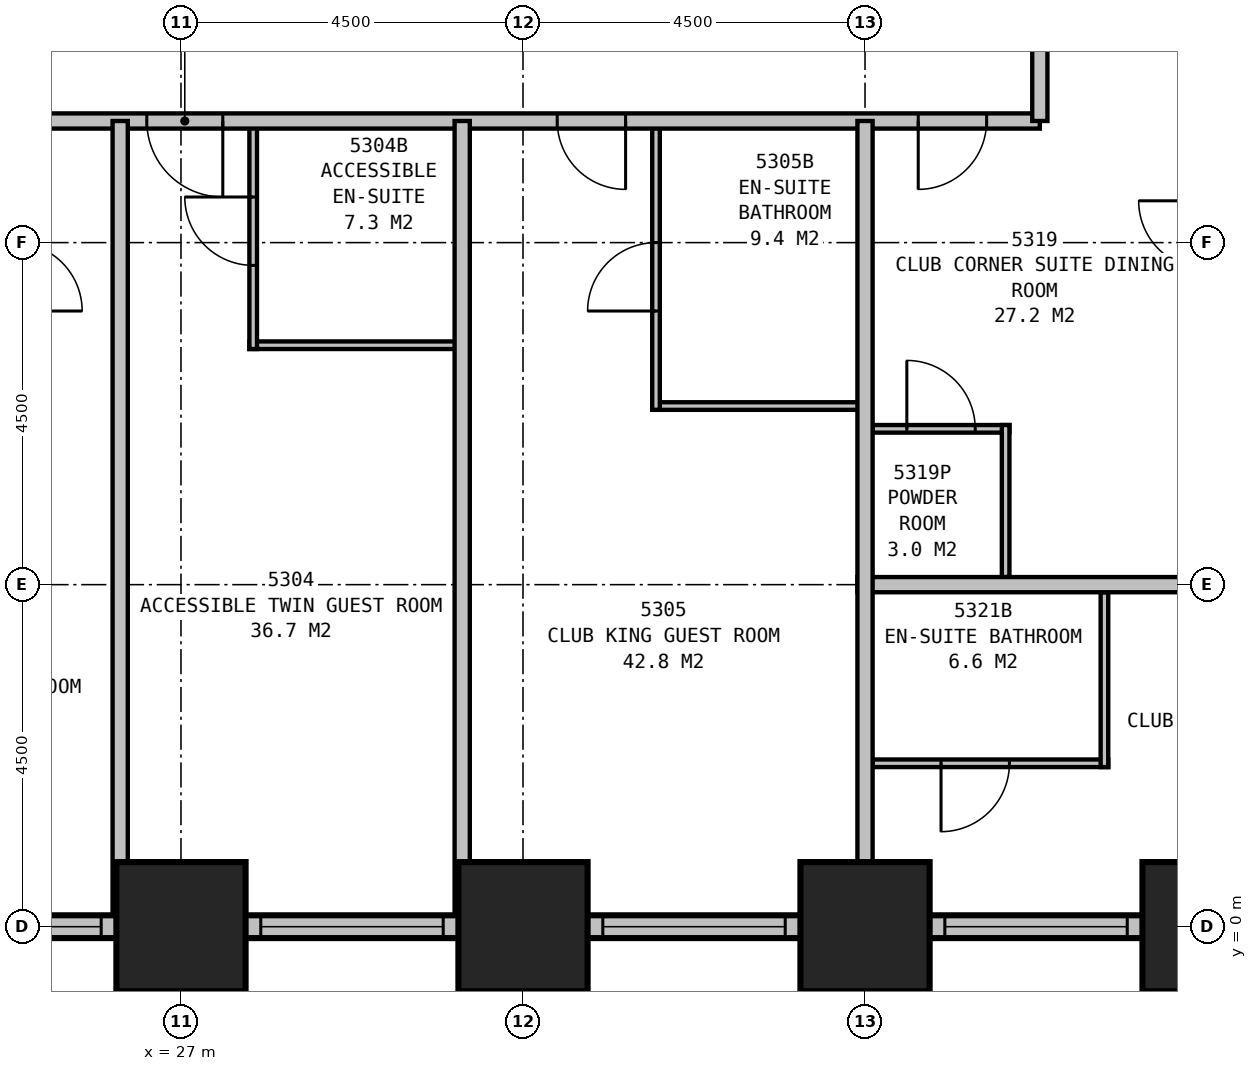
"""IFC4 building model, lengths in metres.
Left out: names, types, materials, properties, quantities, classifications, styles, units other than length and angle.
Written with IfcOpenShell. Run it as: python <this file> out.ifc"""

import sys

from ifc_helpers import new_model, si_unit, direction, frame, frame_2d, origin, origin_2d, place, context, subcontext, project, spatial, rectangle, extrude, element, fill, save


model = new_model("IFC4")
c1 = context("Model", 3, precision=1e-05, world=origin(), true_north=direction((0.0, 1.0)))
c2 = subcontext(c1, "Body", "Model", "MODEL_VIEW")
j1 = project(units=[si_unit("LENGTHUNIT", "METRE"), si_unit("PLANEANGLEUNIT", "RADIAN")], contexts=[c1])
p1 = place(None, origin())
s1 = spatial("IfcSite", under=j1, at=p1, CompositionType="ELEMENT")
p2 = place(p1, origin())
s2 = spatial("IfcBuilding", under=s1, at=p2, CompositionType="ELEMENT")
p3 = place(p2, frame((0.0, 0.0, 204.4)))
s3 = spatial("IfcBuildingStorey", under=s2, at=p3, CompositionType="ELEMENT", Elevation=204.4)
for number, where, z_axis, x_axis in (
    (1, (27.0, 0.0, 0.0), (0.0, 0.0, 1.0), (1.0, 0.0, 0.0)),
    (2, (31.5, 0.0, 0.0), (0.0, 0.0, 1.0), (1.0, 0.0, 0.0)),
    (3, (36.0, 0.0, 0.0), (0.0, 0.0, 1.0), (1.0, 0.0, 0.0)),
    (4, (40.5, 0.0, 0.0), (0.0, 0.0, 1.0), (1.0, 0.0, 0.0)),
):
    element("IfcColumn", number, at=place(p3, frame(where, z_axis=z_axis, x_axis=x_axis)), inside=s3, PredefinedType="COLUMN", context=c2, shape_type="SweptSolid", body=[
        extrude(rectangle(XDim=1.7, YDim=1.7, at=origin_2d()), origin(), (0.0, 0.0, 1.0), 3.5),
    ])
p4 = place(p3, frame((8.85, 0.0, 0.0), z_axis=(0.0, 0.0, 1.0), x_axis=(1.0, 0.0, 0.0)))
e5 = element("IfcWall", 5, at=p4, inside=s3, PredefinedType="STANDARD", context=c2, shape_type="SweptSolid", body=[
    extrude(rectangle(XDim=36.3, YDim=0.3, at=frame_2d((18.15, 0.0))), origin(), (0.0, 0.0, 1.0), 2.25),
])
p5 = place(p4, frame((1.2, 0.0, 0.5)))
e6 = element("IfcOpeningElement", 6, at=p5, cuts=e5, PredefinedType="OPENING", context=c2, shape_type="SweptSolid", body=[
    extrude(rectangle(XDim=2.4, YDim=1.6, at=frame_2d((1.2, 0.8))), frame((0.0, 0.16, 0.0), z_axis=(0.0, -1.0, 0.0), x_axis=(1.0, 0.0, 0.0)), (0.0, 0.0, 1.0), 0.32),
])
p6 = place(p4, frame((5.7, 0.0, 0.5)))
e7 = element("IfcOpeningElement", 7, at=p6, cuts=e5, PredefinedType="OPENING", context=c2, shape_type="SweptSolid", body=[
    extrude(rectangle(XDim=2.4, YDim=1.6, at=frame_2d((1.2, 0.8))), frame((0.0, 0.16, 0.0), z_axis=(0.0, -1.0, 0.0), x_axis=(1.0, 0.0, 0.0)), (0.0, 0.0, 1.0), 0.32),
])
p7 = place(p4, frame((10.2, 0.0, 0.5)))
e8 = element("IfcOpeningElement", 8, at=p7, cuts=e5, PredefinedType="OPENING", context=c2, shape_type="SweptSolid", body=[
    extrude(rectangle(XDim=2.4, YDim=1.6, at=frame_2d((1.2, 0.8))), frame((0.0, 0.16, 0.0), z_axis=(0.0, -1.0, 0.0), x_axis=(1.0, 0.0, 0.0)), (0.0, 0.0, 1.0), 0.32),
])
p8 = place(p4, frame((14.7, 0.0, 0.5)))
e9 = element("IfcOpeningElement", 9, at=p8, cuts=e5, PredefinedType="OPENING", context=c2, shape_type="SweptSolid", body=[
    extrude(rectangle(XDim=2.4, YDim=1.6, at=frame_2d((1.2, 0.8))), frame((0.0, 0.16, 0.0), z_axis=(0.0, -1.0, 0.0), x_axis=(1.0, 0.0, 0.0)), (0.0, 0.0, 1.0), 0.32),
])
p9 = place(p4, frame((19.2, 0.0, 0.5)))
e10 = element("IfcOpeningElement", 10, at=p9, cuts=e5, PredefinedType="OPENING", context=c2, shape_type="SweptSolid", body=[
    extrude(rectangle(XDim=2.4, YDim=1.6, at=frame_2d((1.2, 0.8))), frame((0.0, 0.16, 0.0), z_axis=(0.0, -1.0, 0.0), x_axis=(1.0, 0.0, 0.0)), (0.0, 0.0, 1.0), 0.32),
])
p10 = place(p4, frame((23.7, 0.0, 0.5)))
e11 = element("IfcOpeningElement", 11, at=p10, cuts=e5, PredefinedType="OPENING", context=c2, shape_type="SweptSolid", body=[
    extrude(rectangle(XDim=2.4, YDim=1.6, at=frame_2d((1.2, 0.8))), frame((0.0, 0.16, 0.0), z_axis=(0.0, -1.0, 0.0), x_axis=(1.0, 0.0, 0.0)), (0.0, 0.0, 1.0), 0.32),
])
p11 = place(p4, frame((28.2, 0.0, 0.5)))
e12 = element("IfcOpeningElement", 12, at=p11, cuts=e5, PredefinedType="OPENING", context=c2, shape_type="SweptSolid", body=[
    extrude(rectangle(XDim=2.4, YDim=1.6, at=frame_2d((1.2, 0.8))), frame((0.0, 0.16, 0.0), z_axis=(0.0, -1.0, 0.0), x_axis=(1.0, 0.0, 0.0)), (0.0, 0.0, 1.0), 0.32),
])
p12 = place(p4, frame((32.7, 0.0, 0.5)))
e13 = element("IfcOpeningElement", 13, at=p12, cuts=e5, PredefinedType="OPENING", context=c2, shape_type="SweptSolid", body=[
    extrude(rectangle(XDim=2.4, YDim=1.6, at=frame_2d((1.2, 0.8))), frame((0.0, 0.16, 0.0), z_axis=(0.0, -1.0, 0.0), x_axis=(1.0, 0.0, 0.0)), (0.0, 0.0, 1.0), 0.32),
])
p13 = place(p3, frame((11.2, 10.6, 0.0), z_axis=(0.0, 0.0, 1.0), x_axis=(1.0, 0.0, 0.0)))
e14 = element("IfcWall", 14, at=p13, inside=s3, PredefinedType="PARTITIONING", context=c2, shape_type="SweptSolid", body=[
    extrude(rectangle(XDim=27.1, YDim=0.2, at=frame_2d((13.55, 0.0))), origin(), (0.0, 0.0, 1.0), 3.25),
])
p14 = place(p13, frame((3.5, 0.0, 0.0), z_axis=(0.0, 0.0, 1.0), x_axis=(-1.0, 0.0, 0.0)))
e15 = element("IfcOpeningElement", 15, at=p14, cuts=e14, PredefinedType="OPENING", context=c2, shape_type="SweptSolid", body=[
    extrude(rectangle(XDim=0.9, YDim=2.1, at=frame_2d((0.45, 1.05))), frame((0.0, 0.11, 0.0), z_axis=(0.0, -1.0, 0.0), x_axis=(1.0, 0.0, 0.0)), (0.0, 0.0, 1.0), 0.22),
])
p15 = place(p13, frame((16.35, 0.0, 0.0), z_axis=(0.0, 0.0, 1.0), x_axis=(-1.0, 0.0, 0.0)))
e16 = element("IfcOpeningElement", 16, at=p15, cuts=e14, PredefinedType="OPENING", context=c2, shape_type="SweptSolid", body=[
    extrude(rectangle(XDim=1.0, YDim=2.1, at=frame_2d((0.5, 1.05))), frame((0.0, 0.11, 0.0), z_axis=(0.0, -1.0, 0.0), x_axis=(1.0, 0.0, 0.0)), (0.0, 0.0, 1.0), 0.22),
])
p16 = place(p13, frame((21.65, 0.0, 0.0), z_axis=(0.0, 0.0, 1.0), x_axis=(-1.0, 0.0, 0.0)))
e17 = element("IfcOpeningElement", 17, at=p16, cuts=e14, PredefinedType="OPENING", context=c2, shape_type="SweptSolid", body=[
    extrude(rectangle(XDim=0.9, YDim=2.1, at=frame_2d((0.45, 1.05))), frame((0.0, 0.11, 0.0), z_axis=(0.0, -1.0, 0.0), x_axis=(1.0, 0.0, 0.0)), (0.0, 0.0, 1.0), 0.22),
])
p17 = place(p13, frame((1.6, 0.0, 0.0), z_axis=(0.0, 0.0, 1.0), x_axis=(-1.0, 0.0, 0.0)))
e18 = element("IfcOpeningElement", 18, at=p17, cuts=e14, PredefinedType="OPENING", context=c2, shape_type="SweptSolid", body=[
    extrude(rectangle(XDim=0.9, YDim=2.1, at=frame_2d((0.45, 1.05))), frame((0.0, 0.11, 0.0), z_axis=(0.0, -1.0, 0.0), x_axis=(1.0, 0.0, 0.0)), (0.0, 0.0, 1.0), 0.22),
])
p18 = place(p13, frame((26.4, 0.0, 0.0), z_axis=(0.0, 0.0, 1.0), x_axis=(-1.0, 0.0, 0.0)))
e19 = element("IfcOpeningElement", 19, at=p18, cuts=e14, PredefinedType="OPENING", context=c2, shape_type="SweptSolid", body=[
    extrude(rectangle(XDim=0.9, YDim=2.1, at=frame_2d((0.45, 1.05))), frame((0.0, 0.11, 0.0), z_axis=(0.0, -1.0, 0.0), x_axis=(1.0, 0.0, 0.0)), (0.0, 0.0, 1.0), 0.22),
])
p19 = place(p3, frame((38.3, 10.6, 0.0), z_axis=(0.0, 0.0, 1.0), x_axis=(0.0, 1.0, 0.0)))
e20 = element("IfcWall", 20, at=p19, inside=s3, PredefinedType="PARTITIONING", context=c2, shape_type="SweptSolid", body=[
    extrude(rectangle(XDim=18.7, YDim=0.2, at=frame_2d((9.35, 0.0))), origin(), (0.0, 0.0, 1.0), 3.25),
])
p20 = place(p19, frame((6.95, 0.0, 0.0), z_axis=(0.0, 0.0, 1.0), x_axis=(-1.0, 0.0, 0.0)))
e21 = element("IfcOpeningElement", 21, at=p20, cuts=e20, PredefinedType="OPENING", context=c2, shape_type="SweptSolid", body=[
    extrude(rectangle(XDim=0.9, YDim=2.1, at=frame_2d((0.45, 1.05))), frame((0.0, 0.11, 0.0), z_axis=(0.0, -1.0, 0.0), x_axis=(1.0, 0.0, 0.0)), (0.0, 0.0, 1.0), 0.22),
])
p21 = place(p19, frame((10.9, 0.0, 0.0), z_axis=(0.0, 0.0, 1.0), x_axis=(-1.0, 0.0, 0.0)))
e22 = element("IfcOpeningElement", 22, at=p21, cuts=e20, PredefinedType="OPENING", context=c2, shape_type="SweptSolid", body=[
    extrude(rectangle(XDim=0.9, YDim=2.1, at=frame_2d((0.45, 1.05))), frame((0.0, 0.11, 0.0), z_axis=(0.0, -1.0, 0.0), x_axis=(1.0, 0.0, 0.0)), (0.0, 0.0, 1.0), 0.22),
])
for number, where, z_axis, x_axis in (
    (23, (26.2, 10.6, 0.0), (0.0, 0.0, 1.0), (0.0, -1.0, 0.0)),
    (24, (30.7, 10.6, 0.0), (0.0, 0.0, 1.0), (0.0, -1.0, 0.0)),
):
    element("IfcWall", number, at=place(p3, frame(where, z_axis=z_axis, x_axis=x_axis)), inside=s3, PredefinedType="PARTITIONING", context=c2, shape_type="SweptSolid", body=[
        extrude(rectangle(XDim=10.6, YDim=0.2, at=frame_2d((5.3, 0.0))), origin(), (0.0, 0.0, 1.0), 2.25),
    ])
p22 = place(p3, frame((27.9, 7.65, 0.0), z_axis=(0.0, 0.0, 1.0), x_axis=(1.0, 0.0, 0.0)))
e25 = element("IfcWall", 25, at=p22, inside=s3, PredefinedType="PLUMBINGWALL", context=c2, shape_type="SweptSolid", body=[
    extrude(rectangle(XDim=2.8, YDim=0.1, at=frame_2d((1.4, 0.0))), origin(), (0.0, 0.0, 1.0), 3.25),
])
p23 = place(p3, frame((27.95, 10.6, 0.0), z_axis=(0.0, 0.0, 1.0), x_axis=(0.0, -1.0, 0.0)))
e26 = element("IfcWall", 26, at=p23, inside=s3, PredefinedType="PLUMBINGWALL", context=c2, shape_type="SweptSolid", body=[
    extrude(rectangle(XDim=3.0, YDim=0.1, at=frame_2d((1.5, 0.0))), origin(), (0.0, 0.0, 1.0), 3.25),
])
p24 = place(p23, frame((1.9, 0.0, 0.0), z_axis=(0.0, 0.0, 1.0), x_axis=(-1.0, 0.0, 0.0)))
e27 = element("IfcOpeningElement", 27, at=p24, cuts=e26, PredefinedType="OPENING", context=c2, shape_type="SweptSolid", body=[
    extrude(rectangle(XDim=0.9, YDim=2.1, at=frame_2d((0.45, 1.05))), frame((0.0, 0.06, 0.0), z_axis=(0.0, -1.0, 0.0), x_axis=(1.0, 0.0, 0.0)), (0.0, 0.0, 1.0), 0.12),
])
p25 = place(p3, frame((33.2, 6.85, 0.0), z_axis=(0.0, 0.0, 1.0), x_axis=(1.0, 0.0, 0.0)))
e28 = element("IfcWall", 28, at=p25, inside=s3, PredefinedType="PLUMBINGWALL", context=c2, shape_type="SweptSolid", body=[
    extrude(rectangle(XDim=2.8, YDim=0.1, at=frame_2d((1.4, 0.0))), origin(), (0.0, 0.0, 1.0), 3.25),
])
p26 = place(p3, frame((33.25, 10.6, 0.0), z_axis=(0.0, 0.0, 1.0), x_axis=(0.0, -1.0, 0.0)))
e29 = element("IfcWall", 29, at=p26, inside=s3, PredefinedType="PLUMBINGWALL", context=c2, shape_type="SweptSolid", body=[
    extrude(rectangle(XDim=3.8, YDim=0.1, at=frame_2d((1.9, 0.0))), origin(), (0.0, 0.0, 1.0), 3.25),
])
p27 = place(p26, frame((2.5, 0.0, 0.0), z_axis=(0.0, 0.0, 1.0), x_axis=(-1.0, 0.0, 0.0)))
e30 = element("IfcOpeningElement", 30, at=p27, cuts=e29, PredefinedType="OPENING", context=c2, shape_type="SweptSolid", body=[
    extrude(rectangle(XDim=0.9, YDim=2.1, at=frame_2d((0.45, 1.05))), frame((0.0, 0.06, 0.0), z_axis=(0.0, -1.0, 0.0), x_axis=(1.0, 0.0, 0.0)), (0.0, 0.0, 1.0), 0.12),
])
p28 = place(p3, frame((36.0, 10.6, 0.0), z_axis=(0.0, 0.0, 1.0), x_axis=(0.0, -1.0, 0.0)))
e31 = element("IfcWall", 31, at=p28, inside=s3, PredefinedType="PARTITIONING", context=c2, shape_type="SweptSolid", body=[
    extrude(rectangle(XDim=10.6, YDim=0.2, at=frame_2d((5.3, 0.0))), origin(), (0.0, 0.0, 1.0), 2.25),
])
p29 = place(p3, frame((35.9, 4.5, 0.0), z_axis=(0.0, 0.0, 1.0), x_axis=(1.0, 0.0, 0.0)))
e32 = element("IfcWall", 32, at=p29, inside=s3, PredefinedType="PARTITIONING", context=c2, shape_type="SweptSolid", body=[
    extrude(rectangle(XDim=9.1, YDim=0.2, at=frame_2d((4.55, 0.0))), origin(), (0.0, 0.0, 1.0), 3.25),
])
p30 = place(p29, frame((7.1, 0.0, 0.0)))
e33 = element("IfcOpeningElement", 33, at=p30, cuts=e32, PredefinedType="OPENING", context=c2, shape_type="SweptSolid", body=[
    extrude(rectangle(XDim=0.9, YDim=2.1, at=frame_2d((0.45, 1.05))), frame((0.0, 0.11, 0.0), z_axis=(0.0, -1.0, 0.0), x_axis=(1.0, 0.0, 0.0)), (0.0, 0.0, 1.0), 0.22),
])
p31 = place(p3, frame((37.85, 4.6, 0.0), z_axis=(0.0, 0.0, 1.0), x_axis=(0.0, 1.0, 0.0)))
e34 = element("IfcWall", 34, at=p31, inside=s3, PredefinedType="PLUMBINGWALL", context=c2, shape_type="SweptSolid", body=[
    extrude(rectangle(XDim=2.0, YDim=0.1, at=frame_2d((1.0, 0.0))), origin(), (0.0, 0.0, 1.0), 3.25),
])
p32 = place(p3, frame((36.1, 6.55, 0.0), z_axis=(0.0, 0.0, 1.0), x_axis=(1.0, 0.0, 0.0)))
e35 = element("IfcWall", 35, at=p32, inside=s3, PredefinedType="PLUMBINGWALL", context=c2, shape_type="SweptSolid", body=[
    extrude(rectangle(XDim=1.8, YDim=0.1, at=frame_2d((0.9, 0.0))), origin(), (0.0, 0.0, 1.0), 3.25),
])
p33 = place(p32, frame((0.45, 0.0, 0.0)))
e36 = element("IfcOpeningElement", 36, at=p33, cuts=e35, PredefinedType="OPENING", context=c2, shape_type="SweptSolid", body=[
    extrude(rectangle(XDim=0.9, YDim=2.1, at=frame_2d((0.45, 1.05))), frame((0.0, 0.06, 0.0), z_axis=(0.0, -1.0, 0.0), x_axis=(1.0, 0.0, 0.0)), (0.0, 0.0, 1.0), 0.12),
])
p34 = place(p3, frame((39.15, 4.4, 0.0), z_axis=(0.0, 0.0, 1.0), x_axis=(0.0, -1.0, 0.0)))
e37 = element("IfcWall", 37, at=p34, inside=s3, PredefinedType="PLUMBINGWALL", context=c2, shape_type="SweptSolid", body=[
    extrude(rectangle(XDim=2.3, YDim=0.1, at=frame_2d((1.15, 0.0))), origin(), (0.0, 0.0, 1.0), 3.25),
])
p35 = place(p3, frame((36.1, 2.15, 0.0), z_axis=(0.0, 0.0, 1.0), x_axis=(1.0, 0.0, 0.0)))
e38 = element("IfcWall", 38, at=p35, inside=s3, PredefinedType="PLUMBINGWALL", context=c2, shape_type="SweptSolid", body=[
    extrude(rectangle(XDim=3.1, YDim=0.1, at=frame_2d((1.55, 0.0))), origin(), (0.0, 0.0, 1.0), 3.25),
])
p36 = place(p35, frame((1.8, 0.0, 0.0), z_axis=(0.0, 0.0, 1.0), x_axis=(-1.0, 0.0, 0.0)))
e39 = element("IfcOpeningElement", 39, at=p36, cuts=e38, PredefinedType="OPENING", context=c2, shape_type="SweptSolid", body=[
    extrude(rectangle(XDim=0.9, YDim=2.1, at=frame_2d((0.45, 1.05))), frame((0.0, 0.06, 0.0), z_axis=(0.0, -1.0, 0.0), x_axis=(1.0, 0.0, 0.0)), (0.0, 0.0, 1.0), 0.12),
])
p37 = place(p8, origin())
e40 = element("IfcWindow", 40, at=p37, inside=s3, PartitioningType="SINGLE_PANEL", PredefinedType="WINDOW", context=c2, shape_type="SweptSolid", body=[
    extrude(rectangle(XDim=2.4, YDim=1.6, at=frame_2d((1.2, 0.8))), frame((0.0, 0.03, 0.0), z_axis=(0.0, -1.0, 0.0), x_axis=(1.0, 0.0, 0.0)), (0.0, 0.0, 1.0), 0.06),
])
fill(e9, e40)
p38 = place(p9, origin())
e41 = element("IfcWindow", 41, at=p38, inside=s3, PartitioningType="SINGLE_PANEL", PredefinedType="WINDOW", context=c2, shape_type="SweptSolid", body=[
    extrude(rectangle(XDim=2.4, YDim=1.6, at=frame_2d((1.2, 0.8))), frame((0.0, 0.03, 0.0), z_axis=(0.0, -1.0, 0.0), x_axis=(1.0, 0.0, 0.0)), (0.0, 0.0, 1.0), 0.06),
])
fill(e10, e41)
p39 = place(p10, origin())
e42 = element("IfcWindow", 42, at=p39, inside=s3, PartitioningType="SINGLE_PANEL", PredefinedType="WINDOW", context=c2, shape_type="SweptSolid", body=[
    extrude(rectangle(XDim=2.4, YDim=1.6, at=frame_2d((1.2, 0.8))), frame((0.0, 0.03, 0.0), z_axis=(0.0, -1.0, 0.0), x_axis=(1.0, 0.0, 0.0)), (0.0, 0.0, 1.0), 0.06),
])
fill(e11, e42)
p40 = place(p11, origin())
e43 = element("IfcWindow", 43, at=p40, inside=s3, PartitioningType="SINGLE_PANEL", PredefinedType="WINDOW", context=c2, shape_type="SweptSolid", body=[
    extrude(rectangle(XDim=2.4, YDim=1.6, at=frame_2d((1.2, 0.8))), frame((0.0, 0.03, 0.0), z_axis=(0.0, -1.0, 0.0), x_axis=(1.0, 0.0, 0.0)), (0.0, 0.0, 1.0), 0.06),
])
fill(e12, e43)
p41 = place(p15, origin())
e44 = element("IfcDoor", 44, at=p41, inside=s3, OperationType="SINGLE_SWING_LEFT", PredefinedType="DOOR", context=c2, shape_type="SweptSolid", body=[
    extrude(rectangle(XDim=1.0, YDim=2.1, at=frame_2d((0.5, 1.05))), frame((0.0, 0.025, 0.0), z_axis=(0.0, -1.0, 0.0), x_axis=(1.0, 0.0, 0.0)), (0.0, 0.0, 1.0), 0.05),
])
fill(e16, e44)
p42 = place(p16, origin())
e45 = element("IfcDoor", 45, at=p42, inside=s3, OperationType="SINGLE_SWING_LEFT", PredefinedType="DOOR", context=c2, shape_type="SweptSolid", body=[
    extrude(rectangle(XDim=0.9, YDim=2.1, at=frame_2d((0.45, 1.05))), frame((0.0, 0.025, 0.0), z_axis=(0.0, -1.0, 0.0), x_axis=(1.0, 0.0, 0.0)), (0.0, 0.0, 1.0), 0.05),
])
fill(e17, e45)
p43 = place(p18, origin())
e46 = element("IfcDoor", 46, at=p43, inside=s3, OperationType="SINGLE_SWING_RIGHT", PredefinedType="DOOR", context=c2, shape_type="SweptSolid", body=[
    extrude(rectangle(XDim=0.9, YDim=2.1, at=frame_2d((0.45, 1.05))), frame((0.0, 0.025, 0.0), z_axis=(0.0, -1.0, 0.0), x_axis=(1.0, 0.0, 0.0)), (0.0, 0.0, 1.0), 0.05),
])
fill(e19, e46)
p44 = place(p24, origin())
e47 = element("IfcDoor", 47, at=p44, inside=s3, OperationType="SINGLE_SWING_RIGHT", PredefinedType="DOOR", context=c2, shape_type="SweptSolid", body=[
    extrude(rectangle(XDim=0.9, YDim=2.1, at=frame_2d((0.45, 1.05))), frame((0.0, 0.025, 0.0), z_axis=(0.0, -1.0, 0.0), x_axis=(1.0, 0.0, 0.0)), (0.0, 0.0, 1.0), 0.05),
])
fill(e27, e47)
p45 = place(p27, origin())
e48 = element("IfcDoor", 48, at=p45, inside=s3, OperationType="SINGLE_SWING_LEFT", PredefinedType="DOOR", context=c2, shape_type="SweptSolid", body=[
    extrude(rectangle(XDim=0.9, YDim=2.1, at=frame_2d((0.45, 1.05))), frame((0.0, 0.025, 0.0), z_axis=(0.0, -1.0, 0.0), x_axis=(1.0, 0.0, 0.0)), (0.0, 0.0, 1.0), 0.05),
])
fill(e30, e48)
p46 = place(p33, origin())
e49 = element("IfcDoor", 49, at=p46, inside=s3, OperationType="SINGLE_SWING_LEFT", PredefinedType="DOOR", context=c2, shape_type="SweptSolid", body=[
    extrude(rectangle(XDim=0.9, YDim=2.1, at=frame_2d((0.45, 1.05))), frame((0.0, 0.025, 0.0), z_axis=(0.0, -1.0, 0.0), x_axis=(1.0, 0.0, 0.0)), (0.0, 0.0, 1.0), 0.05),
])
fill(e36, e49)
p47 = place(p36, origin())
e50 = element("IfcDoor", 50, at=p47, inside=s3, OperationType="SINGLE_SWING_RIGHT", PredefinedType="DOOR", context=c2, shape_type="SweptSolid", body=[
    extrude(rectangle(XDim=0.9, YDim=2.1, at=frame_2d((0.45, 1.05))), frame((0.0, 0.025, 0.0), z_axis=(0.0, -1.0, 0.0), x_axis=(1.0, 0.0, 0.0)), (0.0, 0.0, 1.0), 0.05),
])
fill(e39, e50)
save(model, sys.argv[1])
